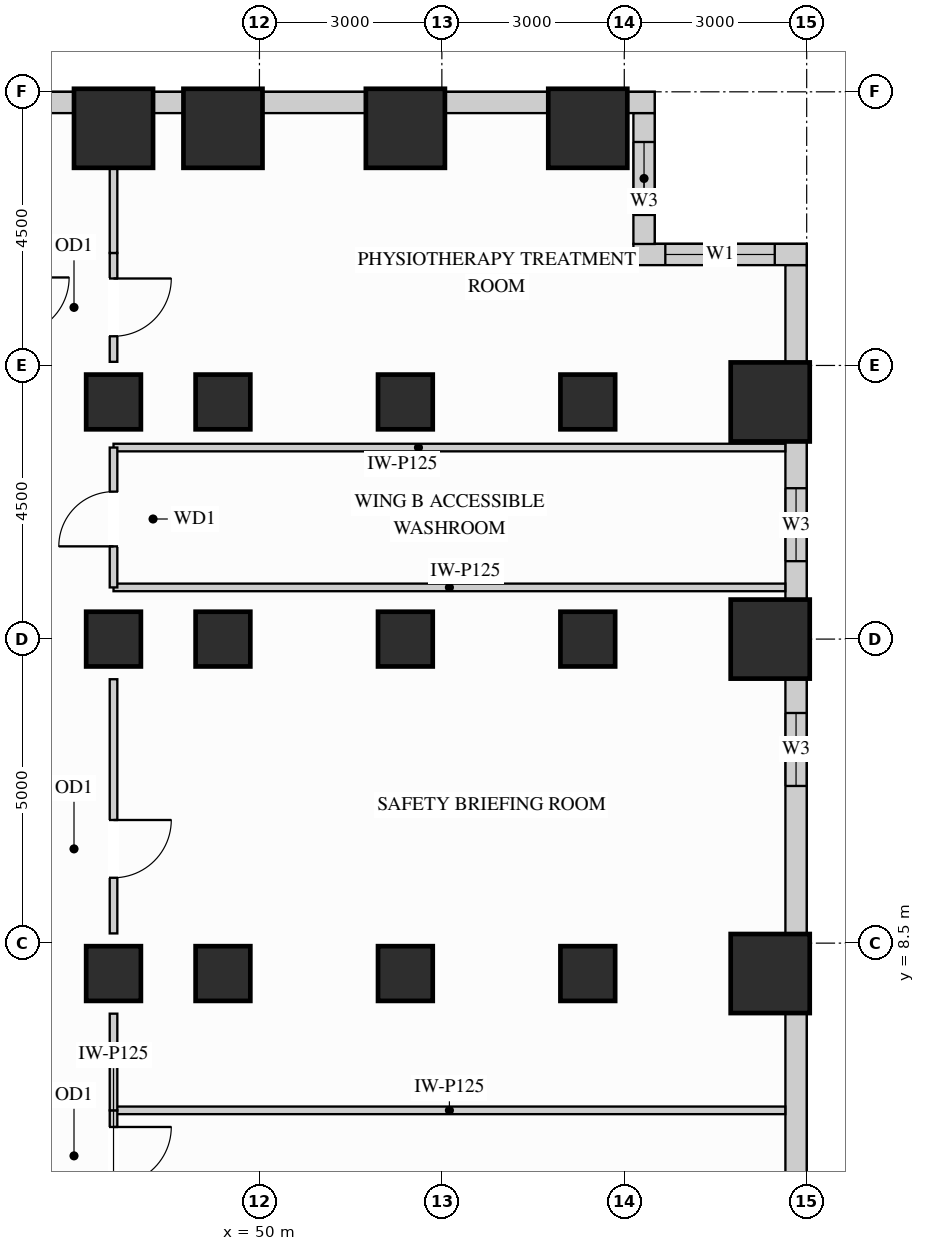
"""IFC4 building model, lengths in metres.
Left out: names, types, materials, properties, quantities, classifications, styles, units other than length and angle.
Written with IfcOpenShell. Run it as: python <this file> out.ifc"""

import sys

from ifc_helpers import new_model, si_unit, direction, frame, frame_2d, origin, origin_2d, place, context, subcontext, project, spatial, rectangle, extrude, source, transform, mapped, element, fill, save


model = new_model("IFC4")
c1 = context("Model", 3, precision=1e-05, world=origin(), true_north=direction((0.0, 1.0)))
c2 = subcontext(c1, "Body", "Model", "MODEL_VIEW")
j1 = project(units=[si_unit("LENGTHUNIT", "METRE"), si_unit("PLANEANGLEUNIT", "RADIAN")], contexts=[c1])
p1 = place(None, origin())
s1 = spatial("IfcSite", under=j1, at=p1, CompositionType="ELEMENT")
p2 = place(p1, origin())
s2 = spatial("IfcBuilding", under=s1, at=p2, CompositionType="ELEMENT")
p3 = place(p2, frame((0.0, 0.0, 54.9)))
s3 = spatial("IfcBuildingStorey", under=s2, at=p3, CompositionType="ELEMENT", Elevation=54.9)
m1 = source(origin(), c2, "Body", "SweptSolid", [
    extrude(rectangle(XDim=0.9, YDim=0.9, at=origin_2d()), origin(), (0.0, 0.0, 1.0), 3.38),
])
for number, where, z_axis, x_axis in (
    (1, (47.6, 13.5, 0.0), (0.0, 0.0, 1.0), (1.0, 0.0, 0.0)),
    (2, (47.6, 8.0, 0.0), (0.0, 0.0, 1.0), (1.0, 0.0, 0.0)),
    (3, (47.6, 17.4, 0.0), (0.0, 0.0, 1.0), (1.0, 0.0, 0.0)),
    (4, (49.4, 13.5, 0.0), (0.0, 0.0, 1.0), (1.0, 0.0, 0.0)),
    (5, (49.4, 17.4, 0.0), (0.0, 0.0, 1.0), (1.0, 0.0, 0.0)),
    (6, (49.4, 8.0, 0.0), (0.0, 0.0, 1.0), (1.0, 0.0, 0.0)),
    (7, (52.4, 13.5, 0.0), (0.0, 0.0, 1.0), (1.0, 0.0, 0.0)),
    (8, (52.4, 17.4, 0.0), (0.0, 0.0, 1.0), (1.0, 0.0, 0.0)),
    (9, (52.4, 8.0, 0.0), (0.0, 0.0, 1.0), (1.0, 0.0, 0.0)),
    (10, (55.4, 13.5, 0.0), (0.0, 0.0, 1.0), (1.0, 0.0, 0.0)),
    (11, (55.4, 17.4, 0.0), (0.0, 0.0, 1.0), (1.0, 0.0, 0.0)),
    (12, (55.4, 8.0, 0.0), (0.0, 0.0, 1.0), (1.0, 0.0, 0.0)),
):
    element("IfcColumn", number, at=place(p3, frame(where, z_axis=z_axis, x_axis=x_axis)), inside=s3, PredefinedType="COLUMN", context=c2, shape_type="MappedRepresentation", body=[
        mapped(m1, transform((0.0, 0.0, 0.0), x_axis=(1.0, 0.0, 0.0), y_axis=(0.0, 1.0, 0.0), z_axis=(0.0, 0.0, 1.0))),
    ])
m2 = source(origin(), c2, "Body", "SweptSolid", [
    extrude(rectangle(XDim=1.3, YDim=1.3, at=origin_2d()), origin(), (0.0, 0.0, 1.0), 3.38),
])
for number, where, z_axis, x_axis in (
    (13, (47.6, 21.9, 0.0), (0.0, 0.0, 1.0), (1.0, 0.0, 0.0)),
    (14, (49.4, 21.9, 0.0), (0.0, 0.0, 1.0), (1.0, 0.0, 0.0)),
    (15, (52.4, 21.9, 0.0), (0.0, 0.0, 1.0), (1.0, 0.0, 0.0)),
    (16, (55.4, 21.9, 0.0), (0.0, 0.0, 1.0), (1.0, 0.0, 0.0)),
    (17, (58.4, 13.5, 0.0), (0.0, 0.0, 1.0), (1.0, 0.0, 0.0)),
    (18, (58.4, 17.4, 0.0), (0.0, 0.0, 1.0), (1.0, 0.0, 0.0)),
    (19, (58.4, 8.0, 0.0), (0.0, 0.0, 1.0), (1.0, 0.0, 0.0)),
):
    element("IfcColumn", number, at=place(p3, frame(where, z_axis=z_axis, x_axis=x_axis)), inside=s3, PredefinedType="COLUMN", context=c2, shape_type="MappedRepresentation", body=[
        mapped(m2, transform((0.0, 0.0, 0.0), x_axis=(1.0, 0.0, 0.0), y_axis=(0.0, 1.0, 0.0), z_axis=(0.0, 0.0, 1.0))),
    ])
m3 = source(origin(), c2, "Body", "SweptSolid", [
    extrude(rectangle(XDim=3.204, YDim=0.35, at=frame_2d((1.602, 0.0))), origin(), (0.0, 0.0, 1.0), 2.51),
])
p4 = place(p3, frame((58.825, 4.148, 0.0), z_axis=(0.0, 0.0, 1.0), x_axis=(0.0, 1.0, 0.0)))
e20 = element("IfcWall", 20, at=p4, inside=s3, PredefinedType="SOLIDWALL", context=c2, shape_type="MappedRepresentation", body=[
    mapped(m3, transform((0.0, 0.0, 0.0), x_axis=(1.0, 0.0, 0.0), y_axis=(0.0, 1.0, 0.0), z_axis=(0.0, 0.0, 1.0))),
])
p5 = place(p3, frame((58.825, 8.648, 0.0), z_axis=(0.0, 0.0, 1.0), x_axis=(0.0, 1.0, 0.0)))
e21 = element("IfcWall", 21, at=p5, inside=s3, PredefinedType="SOLIDWALL", context=c2, shape_type="SweptSolid", body=[
    extrude(rectangle(XDim=4.204, YDim=0.35, at=frame_2d((2.102, 0.0))), origin(), (0.0, 0.0, 1.0), 2.51),
])
p6 = place(p5, frame((2.437, 0.0, 0.78)))
e22 = element("IfcOpeningElement", 22, at=p6, cuts=e21, PredefinedType="OPENING", context=c2, shape_type="SweptSolid", body=[
    extrude(rectangle(XDim=1.2, YDim=1.55, at=frame_2d((0.6, 0.775))), frame((0.0, 0.185, 0.0), z_axis=(0.0, -1.0, 0.0), x_axis=(1.0, 0.0, 0.0)), (0.0, 0.0, 1.0), 0.37),
])
p7 = place(p3, frame((58.825, 14.148, 0.0), z_axis=(0.0, 0.0, 1.0), x_axis=(0.0, 1.0, 0.0)))
e23 = element("IfcWall", 23, at=p7, inside=s3, PredefinedType="SOLIDWALL", context=c2, shape_type="SweptSolid", body=[
    extrude(rectangle(XDim=2.604, YDim=0.35, at=frame_2d((1.302, 0.0))), origin(), (0.0, 0.0, 1.0), 2.51),
])
p8 = place(p7, frame((0.633, 0.0, 0.78)))
e24 = element("IfcOpeningElement", 24, at=p8, cuts=e23, PredefinedType="OPENING", context=c2, shape_type="SweptSolid", body=[
    extrude(rectangle(XDim=1.2, YDim=1.55, at=frame_2d((0.6, 0.775))), frame((0.0, 0.185, 0.0), z_axis=(0.0, -1.0, 0.0), x_axis=(1.0, 0.0, 0.0)), (0.0, 0.0, 1.0), 0.37),
])
m4 = source(origin(), c2, "Body", "SweptSolid", [
    extrude(rectangle(XDim=1.604, YDim=0.35, at=frame_2d((0.802, 0.0))), origin(), (0.0, 0.0, 1.0), 3.365),
])
p9 = place(p3, frame((58.825, 18.048, 0.0), z_axis=(0.0, 0.0, 1.0), x_axis=(0.0, 1.0, 0.0)))
e25 = element("IfcWall", 25, at=p9, inside=s3, PredefinedType="SOLIDWALL", context=c2, shape_type="MappedRepresentation", body=[
    mapped(m4, transform((0.0, 0.0, 0.0), x_axis=(1.0, 0.0, 0.0), y_axis=(0.0, 1.0, 0.0), z_axis=(0.0, 0.0, 1.0))),
])
p10 = place(p3, frame((59.0, 19.825, 0.0), z_axis=(0.0, 0.0, 1.0), x_axis=(-1.0, 0.0, 0.0)))
e26 = element("IfcWall", 26, at=p10, inside=s3, PredefinedType="SOLIDWALL", context=c2, shape_type="SweptSolid", body=[
    extrude(rectangle(XDim=2.85, YDim=0.35, at=frame_2d((1.425, 0.0))), origin(), (0.0, 0.0, 1.0), 3.365),
])
p11 = place(p10, frame((0.525, 0.0, 0.78)))
e27 = element("IfcOpeningElement", 27, at=p11, cuts=e26, PredefinedType="OPENING", context=c2, shape_type="SweptSolid", body=[
    extrude(rectangle(XDim=1.8, YDim=2.1, at=frame_2d((0.9, 1.05))), frame((0.0, 0.185, 0.0), z_axis=(0.0, -1.0, 0.0), x_axis=(1.0, 0.0, 0.0)), (0.0, 0.0, 1.0), 0.37),
])
p12 = place(p3, frame((56.325, 19.998, 0.0), z_axis=(0.0, 0.0, 1.0), x_axis=(0.0, 1.0, 0.0)))
e28 = element("IfcWall", 28, at=p12, inside=s3, PredefinedType="SOLIDWALL", context=c2, shape_type="SweptSolid", body=[
    extrude(rectangle(XDim=2.154, YDim=0.35, at=frame_2d((1.077, 0.0))), origin(), (0.0, 0.0, 1.0), 3.365),
])
p13 = place(p12, frame((0.477, 0.0, 0.78)))
e29 = element("IfcOpeningElement", 29, at=p13, cuts=e28, PredefinedType="OPENING", context=c2, shape_type="SweptSolid", body=[
    extrude(rectangle(XDim=1.2, YDim=2.1, at=frame_2d((0.6, 1.05))), frame((0.0, 0.185, 0.0), z_axis=(0.0, -1.0, 0.0), x_axis=(1.0, 0.0, 0.0)), (0.0, 0.0, 1.0), 0.37),
])
m5 = source(origin(), c2, "Body", "SweptSolid", [
    extrude(rectangle(XDim=0.452, YDim=0.35, at=frame_2d((0.226, 0.0))), origin(), (0.0, 0.0, 1.0), 3.365),
])
p14 = place(p3, frame((56.5, 22.325, 0.0), z_axis=(0.0, 0.0, 1.0), x_axis=(-1.0, 0.0, 0.0)))
e30 = element("IfcWall", 30, at=p14, inside=s3, PredefinedType="SOLIDWALL", context=c2, shape_type="MappedRepresentation", body=[
    mapped(m5, transform((0.0, 0.0, 0.0), x_axis=(1.0, 0.0, 0.0), y_axis=(0.0, 1.0, 0.0), z_axis=(0.0, 0.0, 1.0))),
])
m6 = source(origin(), c2, "Body", "SweptSolid", [
    extrude(rectangle(XDim=1.704, YDim=0.35, at=frame_2d((0.852, 0.0))), origin(), (0.0, 0.0, 1.0), 2.51),
])
for number, where, z_axis, x_axis in (
    (31, (54.752, 22.325, 0.0), (0.0, 0.0, 1.0), (-1.0, 0.0, 0.0)),
    (32, (51.752, 22.325, 0.0), (0.0, 0.0, 1.0), (-1.0, 0.0, 0.0)),
):
    element("IfcWall", number, at=place(p3, frame(where, z_axis=z_axis, x_axis=x_axis)), inside=s3, PredefinedType="SOLIDWALL", context=c2, shape_type="MappedRepresentation", body=[
        mapped(m6, transform((0.0, 0.0, 0.0), x_axis=(1.0, 0.0, 0.0), y_axis=(0.0, 1.0, 0.0), z_axis=(0.0, 0.0, 1.0))),
    ])
m7 = source(origin(), c2, "Body", "SweptSolid", [
    extrude(rectangle(XDim=0.504, YDim=0.35, at=frame_2d((0.252, 0.0))), origin(), (0.0, 0.0, 1.0), 3.365),
])
p15 = place(p3, frame((48.752, 22.325, 0.0), z_axis=(0.0, 0.0, 1.0), x_axis=(-1.0, 0.0, 0.0)))
e33 = element("IfcWall", 33, at=p15, inside=s3, PredefinedType="SOLIDWALL", context=c2, shape_type="MappedRepresentation", body=[
    mapped(m7, transform((0.0, 0.0, 0.0), x_axis=(1.0, 0.0, 0.0), y_axis=(0.0, 1.0, 0.0), z_axis=(0.0, 0.0, 1.0))),
])
p16 = place(p3, frame((46.952, 22.325, 0.0), z_axis=(0.0, 0.0, 1.0), x_axis=(-1.0, 0.0, 0.0)))
e34 = element("IfcWall", 34, at=p16, inside=s3, PredefinedType="SOLIDWALL", context=c2, shape_type="SweptSolid", body=[
    extrude(rectangle(XDim=6.304, YDim=0.35, at=frame_2d((3.152, 0.0))), origin(), (0.0, 0.0, 1.0), 2.51),
])
p17 = place(p16, frame((1.649, 0.0, 0.78)))
e35 = element("IfcOpeningElement", 35, at=p17, cuts=e34, PredefinedType="OPENING", context=c2, shape_type="SweptSolid", body=[
    extrude(rectangle(XDim=1.8, YDim=1.55, at=frame_2d((0.9, 0.775))), frame((0.0, 0.185, 0.0), z_axis=(0.0, -1.0, 0.0), x_axis=(1.0, 0.0, 0.0)), (0.0, 0.0, 1.0), 0.37),
])
p18 = place(p16, frame((3.817, 0.0, 0.78)))
e36 = element("IfcOpeningElement", 36, at=p18, cuts=e34, PredefinedType="OPENING", context=c2, shape_type="SweptSolid", body=[
    extrude(rectangle(XDim=1.8, YDim=1.55, at=frame_2d((0.9, 0.775))), frame((0.0, 0.185, 0.0), z_axis=(0.0, -1.0, 0.0), x_axis=(1.0, 0.0, 0.0)), (0.0, 0.0, 1.0), 0.37),
])
m8 = source(origin(), c2, "Body", "SweptSolid", [
    extrude(rectangle(XDim=11.048, YDim=0.125, at=frame_2d((5.524, 0.0))), origin(), (0.0, 0.0, 1.0), 3.365),
])
p19 = place(p3, frame((47.6, 14.35, 0.0), z_axis=(0.0, 0.0, 1.0), x_axis=(1.0, 0.0, 0.0)))
e37 = element("IfcWall", 37, at=p19, inside=s3, PredefinedType="PARTITIONING", context=c2, shape_type="MappedRepresentation", body=[
    mapped(m8, transform((0.0, 0.0, 0.0), x_axis=(1.0, 0.0, 0.0), y_axis=(0.0, 1.0, 0.0), z_axis=(0.0, 0.0, 1.0))),
])
m9 = source(origin(), c2, "Body", "SweptSolid", [
    extrude(rectangle(XDim=11.048, YDim=0.125, at=frame_2d((5.524, 0.0))), origin(), (0.0, 0.0, 1.0), 2.67),
])
p20 = place(p3, frame((47.6, 16.65, 0.0), z_axis=(0.0, 0.0, 1.0), x_axis=(1.0, 0.0, 0.0)))
e38 = element("IfcWall", 38, at=p20, inside=s3, PredefinedType="PARTITIONING", context=c2, shape_type="MappedRepresentation", body=[
    mapped(m9, transform((0.0, 0.0, 0.0), x_axis=(1.0, 0.0, 0.0), y_axis=(0.0, 1.0, 0.0), z_axis=(0.0, 0.0, 1.0))),
])
p21 = place(p3, frame((47.6, 5.75, 0.0), z_axis=(0.0, 0.0, 1.0), x_axis=(1.0, 0.0, 0.0)))
e39 = element("IfcWall", 39, at=p21, inside=s3, PredefinedType="PARTITIONING", context=c2, shape_type="MappedRepresentation", body=[
    mapped(m8, transform((0.0, 0.0, 0.0), x_axis=(1.0, 0.0, 0.0), y_axis=(0.0, 1.0, 0.0), z_axis=(0.0, 0.0, 1.0))),
])
p22 = place(p3, frame((47.6, 4.16, 0.0), z_axis=(0.0, 0.0, 1.0), x_axis=(0.0, 1.0, 0.0)))
e40 = element("IfcWall", 40, at=p22, inside=s3, PredefinedType="PARTITIONING", context=c2, shape_type="SweptSolid", body=[
    extrude(rectangle(XDim=1.59, YDim=0.125, at=frame_2d((0.795, 0.0))), origin(), (0.0, 0.0, 1.0), 2.67),
])
p23 = place(p22, frame((0.367, 0.0, 0.0)))
e41 = element("IfcOpeningElement", 41, at=p23, cuts=e40, PredefinedType="OPENING", context=c2, shape_type="SweptSolid", body=[
    extrude(rectangle(XDim=0.95, YDim=2.15, at=frame_2d((0.475, 1.075))), frame((0.0, 0.073, 0.0), z_axis=(0.0, -1.0, 0.0), x_axis=(1.0, 0.0, 0.0)), (0.0, 0.0, 1.0), 0.145),
])
m10 = source(origin(), c2, "Body", "SweptSolid", [
    extrude(rectangle(XDim=1.59, YDim=0.125, at=frame_2d((0.795, 0.0))), origin(), (0.0, 0.0, 1.0), 2.67),
])
p24 = place(p3, frame((47.6, 5.75, 0.0), z_axis=(0.0, 0.0, 1.0), x_axis=(0.0, 1.0, 0.0)))
e42 = element("IfcWall", 42, at=p24, inside=s3, PredefinedType="PARTITIONING", context=c2, shape_type="MappedRepresentation", body=[
    mapped(m10, transform((0.0, 0.0, 0.0), x_axis=(1.0, 0.0, 0.0), y_axis=(0.0, 1.0, 0.0), z_axis=(0.0, 0.0, 1.0))),
])
p25 = place(p3, frame((47.6, 8.66, 0.0), z_axis=(0.0, 0.0, 1.0), x_axis=(0.0, 1.0, 0.0)))
e43 = element("IfcWall", 43, at=p25, inside=s3, PredefinedType="PARTITIONING", context=c2, shape_type="SweptSolid", body=[
    extrude(rectangle(XDim=4.18, YDim=0.125, at=frame_2d((2.09, 0.0))), origin(), (0.0, 0.0, 1.0), 2.67),
])
p26 = place(p25, frame((0.915, 0.0, 0.0)))
e44 = element("IfcOpeningElement", 44, at=p26, cuts=e43, PredefinedType="OPENING", context=c2, shape_type="SweptSolid", body=[
    extrude(rectangle(XDim=0.95, YDim=2.15, at=frame_2d((0.475, 1.075))), frame((0.0, 0.073, 0.0), z_axis=(0.0, -1.0, 0.0), x_axis=(1.0, 0.0, 0.0)), (0.0, 0.0, 1.0), 0.145),
])
p27 = place(p3, frame((47.6, 18.06, 0.0), z_axis=(0.0, 0.0, 1.0), x_axis=(0.0, 1.0, 0.0)))
e45 = element("IfcWall", 45, at=p27, inside=s3, PredefinedType="PARTITIONING", context=c2, shape_type="SweptSolid", body=[
    extrude(rectangle(XDim=1.79, YDim=0.125, at=frame_2d((0.895, 0.0))), origin(), (0.0, 0.0, 1.0), 2.67),
])
p28 = place(p27, frame((0.42, 0.0, 0.0)))
e46 = element("IfcOpeningElement", 46, at=p28, cuts=e45, PredefinedType="OPENING", context=c2, shape_type="SweptSolid", body=[
    extrude(rectangle(XDim=0.95, YDim=2.15, at=frame_2d((0.475, 1.075))), frame((0.0, 0.073, 0.0), z_axis=(0.0, -1.0, 0.0), x_axis=(1.0, 0.0, 0.0)), (0.0, 0.0, 1.0), 0.145),
])
m11 = source(origin(), c2, "Body", "SweptSolid", [
    extrude(rectangle(XDim=1.39, YDim=0.125, at=frame_2d((0.695, 0.0))), origin(), (0.0, 0.0, 1.0), 2.67),
])
p29 = place(p3, frame((47.6, 19.85, 0.0), z_axis=(0.0, 0.0, 1.0), x_axis=(0.0, 1.0, 0.0)))
e47 = element("IfcWall", 47, at=p29, inside=s3, PredefinedType="PARTITIONING", context=c2, shape_type="MappedRepresentation", body=[
    mapped(m11, transform((0.0, 0.0, 0.0), x_axis=(1.0, 0.0, 0.0), y_axis=(0.0, 1.0, 0.0), z_axis=(0.0, 0.0, 1.0))),
])
p30 = place(p3, frame((47.6, 14.35, 0.0), z_axis=(0.0, 0.0, 1.0), x_axis=(0.0, 1.0, 0.0)))
e48 = element("IfcWall", 48, at=p30, inside=s3, PredefinedType="PARTITIONING", context=c2, shape_type="SweptSolid", body=[
    extrude(rectangle(XDim=2.3, YDim=0.125, at=frame_2d((1.15, 0.0))), origin(), (0.0, 0.0, 1.0), 2.67),
])
p31 = place(p30, frame((0.675, 0.0, 0.0)))
e49 = element("IfcOpeningElement", 49, at=p31, cuts=e48, PredefinedType="OPENING", context=c2, shape_type="SweptSolid", body=[
    extrude(rectangle(XDim=0.9, YDim=2.15, at=frame_2d((0.45, 1.075))), frame((0.0, 0.073, 0.0), z_axis=(0.0, -1.0, 0.0), x_axis=(1.0, 0.0, 0.0)), (0.0, 0.0, 1.0), 0.145),
])
m12 = source(origin(), c2, "Body", "SweptSolid", [
    extrude(rectangle(XDim=0.95, YDim=2.15, at=frame_2d((0.475, 1.075))), frame((0.0, 0.025, 0.0), z_axis=(0.0, -1.0, 0.0), x_axis=(1.0, 0.0, 0.0)), (0.0, 0.0, 1.0), 0.05),
])
p32 = place(p23, origin())
e50 = element("IfcDoor", 50, at=p32, inside=s3, OperationType="SINGLE_SWING_RIGHT", PredefinedType="DOOR", context=c2, shape_type="MappedRepresentation", body=[
    mapped(m12, transform((0.0, 0.0, 0.0), x_axis=(1.0, 0.0, 0.0), y_axis=(0.0, 1.0, 0.0), z_axis=(0.0, 0.0, 1.0))),
])
fill(e41, e50)
p33 = place(p26, origin())
e51 = element("IfcDoor", 51, at=p33, inside=s3, OperationType="SINGLE_SWING_RIGHT", PredefinedType="DOOR", context=c2, shape_type="MappedRepresentation", body=[
    mapped(m12, transform((0.0, 0.0, 0.0), x_axis=(1.0, 0.0, 0.0), y_axis=(0.0, 1.0, 0.0), z_axis=(0.0, 0.0, 1.0))),
])
fill(e44, e51)
p34 = place(p28, origin())
e52 = element("IfcDoor", 52, at=p34, inside=s3, OperationType="SINGLE_SWING_RIGHT", PredefinedType="DOOR", context=c2, shape_type="MappedRepresentation", body=[
    mapped(m12, transform((0.0, 0.0, 0.0), x_axis=(1.0, 0.0, 0.0), y_axis=(0.0, 1.0, 0.0), z_axis=(0.0, 0.0, 1.0))),
])
fill(e46, e52)
m13 = source(origin(), c2, "Body", "SweptSolid", [
    extrude(rectangle(XDim=0.9, YDim=2.15, at=frame_2d((0.45, 1.075))), frame((0.0, 0.025, 0.0), z_axis=(0.0, -1.0, 0.0), x_axis=(1.0, 0.0, 0.0)), (0.0, 0.0, 1.0), 0.05),
])
p35 = place(p31, origin())
e53 = element("IfcDoor", 53, at=p35, inside=s3, OperationType="SINGLE_SWING_LEFT", PredefinedType="DOOR", context=c2, shape_type="MappedRepresentation", body=[
    mapped(m13, transform((0.0, 0.0, 0.0), x_axis=(1.0, 0.0, 0.0), y_axis=(0.0, 1.0, 0.0), z_axis=(0.0, 0.0, 1.0))),
])
fill(e49, e53)
m14 = source(origin(), c2, "Body", "SweptSolid", [
    extrude(rectangle(XDim=1.8, YDim=2.1, at=frame_2d((0.9, 1.05))), frame((0.0, 0.03, 0.0), z_axis=(0.0, -1.0, 0.0), x_axis=(1.0, 0.0, 0.0)), (0.0, 0.0, 1.0), 0.06),
])
p36 = place(p11, origin())
e54 = element("IfcWindow", 54, at=p36, inside=s3, PartitioningType="SINGLE_PANEL", PredefinedType="WINDOW", context=c2, shape_type="MappedRepresentation", body=[
    mapped(m14, transform((0.0, 0.0, 0.0), x_axis=(1.0, 0.0, 0.0), y_axis=(0.0, 1.0, 0.0), z_axis=(0.0, 0.0, 1.0))),
])
fill(e27, e54)
m15 = source(origin(), c2, "Body", "SweptSolid", [
    extrude(rectangle(XDim=1.2, YDim=1.55, at=frame_2d((0.6, 0.775))), frame((0.0, 0.03, 0.0), z_axis=(0.0, -1.0, 0.0), x_axis=(1.0, 0.0, 0.0)), (0.0, 0.0, 1.0), 0.06),
])
p37 = place(p6, origin())
e55 = element("IfcWindow", 55, at=p37, inside=s3, PartitioningType="SINGLE_PANEL", PredefinedType="WINDOW", context=c2, shape_type="MappedRepresentation", body=[
    mapped(m15, transform((0.0, 0.0, 0.0), x_axis=(1.0, 0.0, 0.0), y_axis=(0.0, 1.0, 0.0), z_axis=(0.0, 0.0, 1.0))),
])
fill(e22, e55)
p38 = place(p8, origin())
e56 = element("IfcWindow", 56, at=p38, inside=s3, PartitioningType="SINGLE_PANEL", PredefinedType="WINDOW", context=c2, shape_type="MappedRepresentation", body=[
    mapped(m15, transform((0.0, 0.0, 0.0), x_axis=(1.0, 0.0, 0.0), y_axis=(0.0, 1.0, 0.0), z_axis=(0.0, 0.0, 1.0))),
])
fill(e24, e56)
m16 = source(origin(), c2, "Body", "SweptSolid", [
    extrude(rectangle(XDim=1.2, YDim=2.1, at=frame_2d((0.6, 1.05))), frame((0.0, 0.03, 0.0), z_axis=(0.0, -1.0, 0.0), x_axis=(1.0, 0.0, 0.0)), (0.0, 0.0, 1.0), 0.06),
])
p39 = place(p13, origin())
e57 = element("IfcWindow", 57, at=p39, inside=s3, PartitioningType="SINGLE_PANEL", PredefinedType="WINDOW", context=c2, shape_type="MappedRepresentation", body=[
    mapped(m16, transform((0.0, 0.0, 0.0), x_axis=(1.0, 0.0, 0.0), y_axis=(0.0, 1.0, 0.0), z_axis=(0.0, 0.0, 1.0))),
])
fill(e29, e57)
save(model, sys.argv[1])
